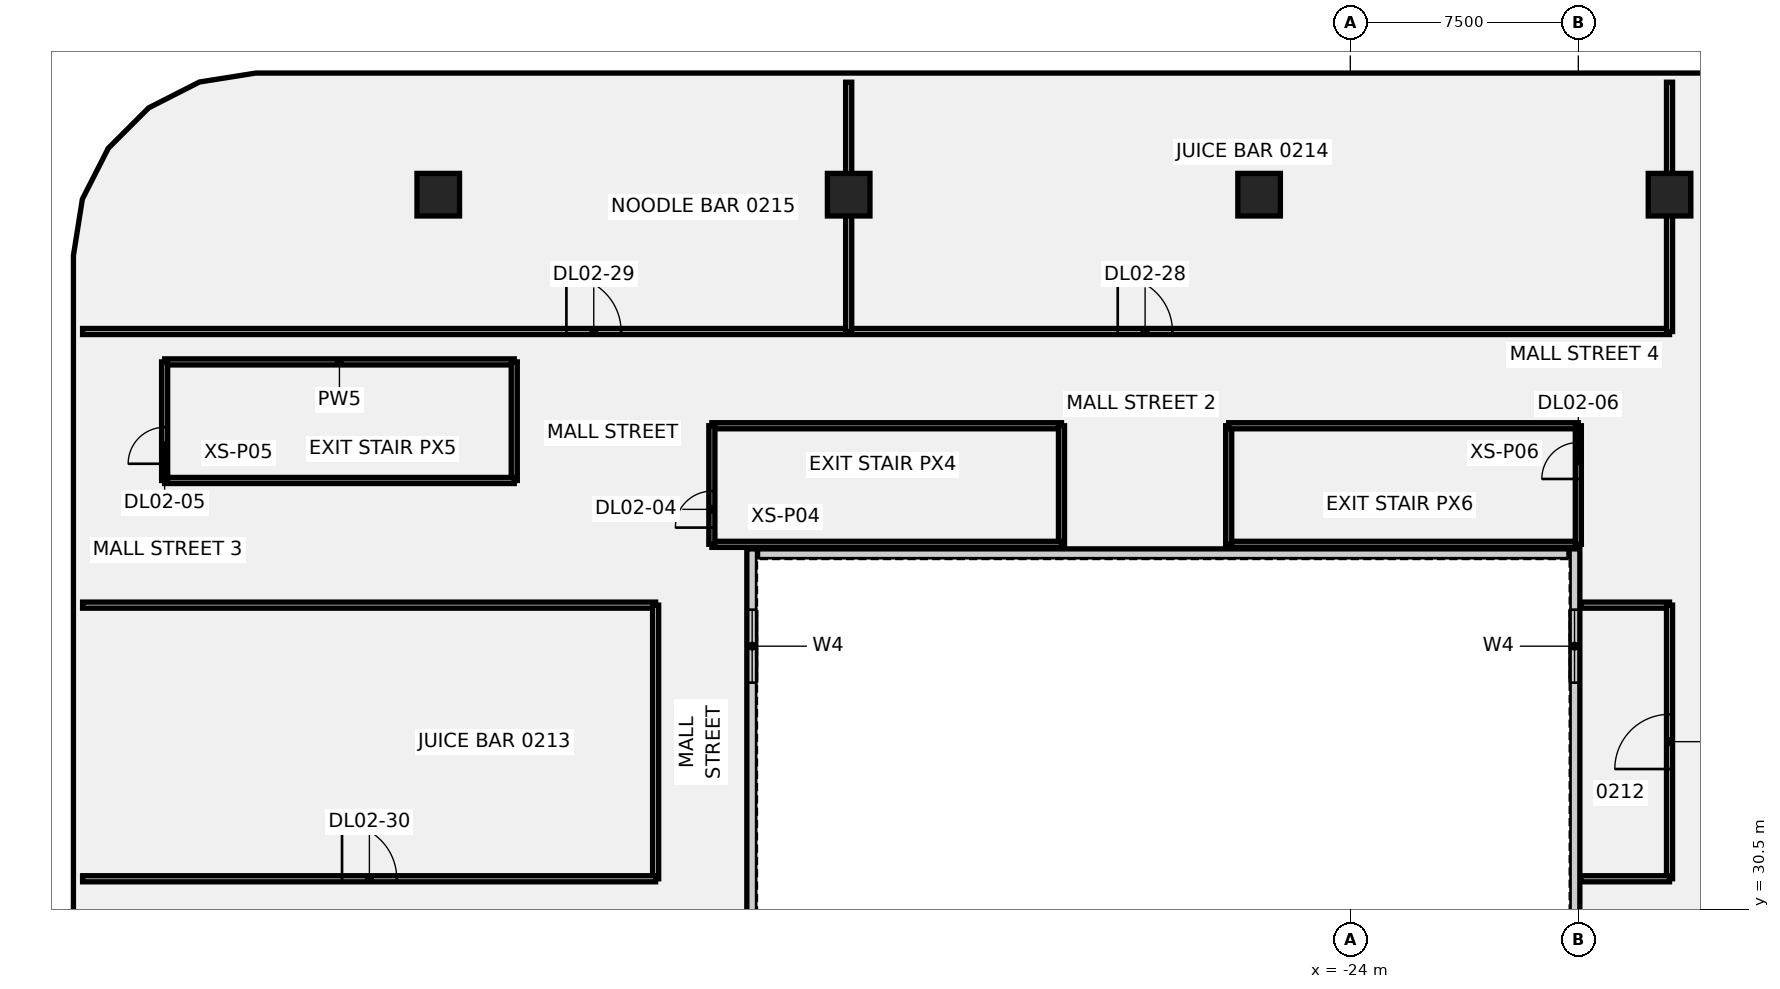
"""IFC4 building model, lengths in metres.
Left out: names, types, materials, properties, quantities, classifications, styles, units other than length and angle.
Written with IfcOpenShell. Run it as: python <this file> out.ifc"""

import sys

from ifc_helpers import new_model, si_unit, direction, frame, frame_2d, origin, origin_2d, place, context, subcontext, project, spatial, rectangle, extrude, element, fill, save


model = new_model("IFC4")
c1 = context("Model", 3, precision=1e-05, world=origin(), true_north=direction((0.0, 1.0)))
c2 = subcontext(c1, "Body", "Model", "MODEL_VIEW")
j1 = project(units=[si_unit("LENGTHUNIT", "METRE"), si_unit("PLANEANGLEUNIT", "RADIAN")], contexts=[c1])
p1 = place(None, origin())
s1 = spatial("IfcSite", under=j1, at=p1, CompositionType="ELEMENT")
p2 = place(p1, origin())
s2 = spatial("IfcBuilding", under=s1, at=p2, CompositionType="ELEMENT")
p3 = place(p2, frame((0.0, 0.0, 15.0)))
s3 = spatial("IfcBuildingStorey", under=s2, at=p3, CompositionType="ELEMENT", Elevation=15.0)
for number, where, z_axis, x_axis in (
    (1, (-54.0, 54.0, -0.5), (0.0, 0.0, 1.0), (1.0, 0.0, 0.0)),
    (2, (-40.5, 54.0, -0.5), (0.0, 0.0, 1.0), (1.0, 0.0, 0.0)),
    (3, (-27.0, 54.0, -0.5), (0.0, 0.0, 1.0), (1.0, 0.0, 0.0)),
    (4, (-13.5, 54.0, -0.5), (0.0, 0.0, 1.0), (1.0, 0.0, 0.0)),
):
    element("IfcColumn", number, at=place(p3, frame(where, z_axis=z_axis, x_axis=x_axis)), inside=s3, PredefinedType="COLUMN", context=c2, shape_type="SweptSolid", body=[
        extrude(rectangle(XDim=1.4, YDim=1.4, at=origin_2d()), origin(), (0.0, 0.0, 1.0), 5.0),
    ])
p4 = place(p3, frame((-63.0, 48.5, 0.0), z_axis=(0.0, 0.0, 1.0), x_axis=(1.0, 0.0, 0.0)))
e5 = element("IfcWall", 5, at=p4, inside=s3, PredefinedType="PARTITIONING", context=c2, shape_type="SweptSolid", body=[
    extrude(rectangle(XDim=11.5, YDim=0.2, at=frame_2d((5.75, 0.0))), origin(), (0.0, 0.0, 1.0), 4.5),
])
p5 = place(p3, frame((-51.5, 44.6, 0.0), z_axis=(0.0, 0.0, 1.0), x_axis=(0.0, 1.0, 0.0)))
e6 = element("IfcWall", 6, at=p5, inside=s3, PredefinedType="PARTITIONING", context=c2, shape_type="SweptSolid", body=[
    extrude(rectangle(XDim=3.9, YDim=0.2, at=frame_2d((1.95, 0.0))), origin(), (0.0, 0.0, 1.0), 4.5),
])
p6 = place(p3, frame((-63.0, 44.6, 0.0), z_axis=(0.0, 0.0, 1.0), x_axis=(1.0, 0.0, 0.0)))
e7 = element("IfcWall", 7, at=p6, inside=s3, PredefinedType="PARTITIONING", context=c2, shape_type="SweptSolid", body=[
    extrude(rectangle(XDim=11.5, YDim=0.2, at=frame_2d((5.75, 0.0))), origin(), (0.0, 0.0, 1.0), 4.5),
])
p7 = place(p3, frame((-63.0, 44.6, 0.0), z_axis=(0.0, 0.0, 1.0), x_axis=(0.0, 1.0, 0.0)))
e8 = element("IfcWall", 8, at=p7, inside=s3, PredefinedType="PARTITIONING", context=c2, shape_type="SweptSolid", body=[
    extrude(rectangle(XDim=3.9, YDim=0.2, at=frame_2d((1.95, 0.0))), origin(), (0.0, 0.0, 1.0), 4.5),
])
p8 = place(p7, frame((0.55, 0.0, 0.0)))
e9 = element("IfcOpeningElement", 9, at=p8, cuts=e8, PredefinedType="OPENING", context=c2, shape_type="SweptSolid", body=[
    extrude(rectangle(XDim=1.2, YDim=2.1, at=frame_2d((0.6, 1.05))), frame((0.0, 0.11, 0.0), z_axis=(0.0, -1.0, 0.0), x_axis=(1.0, 0.0, 0.0)), (0.0, 0.0, 1.0), 0.22),
])
p9 = place(p3, frame((-45.0, 46.4, 0.0), z_axis=(0.0, 0.0, 1.0), x_axis=(1.0, 0.0, 0.0)))
e10 = element("IfcWall", 10, at=p9, inside=s3, PredefinedType="PARTITIONING", context=c2, shape_type="SweptSolid", body=[
    extrude(rectangle(XDim=11.5, YDim=0.2, at=frame_2d((5.75, 0.0))), origin(), (0.0, 0.0, 1.0), 4.5),
])
p10 = place(p3, frame((-33.5, 42.5, 0.0), z_axis=(0.0, 0.0, 1.0), x_axis=(0.0, 1.0, 0.0)))
e11 = element("IfcWall", 11, at=p10, inside=s3, PredefinedType="PARTITIONING", context=c2, shape_type="SweptSolid", body=[
    extrude(rectangle(XDim=3.9, YDim=0.2, at=frame_2d((1.95, 0.0))), origin(), (0.0, 0.0, 1.0), 4.5),
])
p11 = place(p3, frame((-45.0, 42.5, 0.0), z_axis=(0.0, 0.0, 1.0), x_axis=(1.0, 0.0, 0.0)))
e12 = element("IfcWall", 12, at=p11, inside=s3, PredefinedType="PARTITIONING", context=c2, shape_type="SweptSolid", body=[
    extrude(rectangle(XDim=11.5, YDim=0.2, at=frame_2d((5.75, 0.0))), origin(), (0.0, 0.0, 1.0), 4.5),
])
p12 = place(p3, frame((-45.0, 42.5, 0.0), z_axis=(0.0, 0.0, 1.0), x_axis=(0.0, 1.0, 0.0)))
e13 = element("IfcWall", 13, at=p12, inside=s3, PredefinedType="PARTITIONING", context=c2, shape_type="SweptSolid", body=[
    extrude(rectangle(XDim=3.9, YDim=0.2, at=frame_2d((1.95, 0.0))), origin(), (0.0, 0.0, 1.0), 4.5),
])
p13 = place(p12, frame((0.55, 0.0, 0.0)))
e14 = element("IfcOpeningElement", 14, at=p13, cuts=e13, PredefinedType="OPENING", context=c2, shape_type="SweptSolid", body=[
    extrude(rectangle(XDim=1.2, YDim=2.1, at=frame_2d((0.6, 1.05))), frame((0.0, 0.11, 0.0), z_axis=(0.0, -1.0, 0.0), x_axis=(1.0, 0.0, 0.0)), (0.0, 0.0, 1.0), 0.22),
])
p14 = place(p3, frame((-28.0, 42.5, 0.0), z_axis=(0.0, 0.0, 1.0), x_axis=(1.0, 0.0, 0.0)))
e15 = element("IfcWall", 15, at=p14, inside=s3, PredefinedType="PARTITIONING", context=c2, shape_type="SweptSolid", body=[
    extrude(rectangle(XDim=11.5, YDim=0.2, at=frame_2d((5.75, 0.0))), origin(), (0.0, 0.0, 1.0), 4.5),
])
p15 = place(p3, frame((-28.0, 42.5, 0.0), z_axis=(0.0, 0.0, 1.0), x_axis=(0.0, 1.0, 0.0)))
e16 = element("IfcWall", 16, at=p15, inside=s3, PredefinedType="PARTITIONING", context=c2, shape_type="SweptSolid", body=[
    extrude(rectangle(XDim=3.9, YDim=0.2, at=frame_2d((1.95, 0.0))), origin(), (0.0, 0.0, 1.0), 4.5),
])
p16 = place(p3, frame((-28.0, 46.4, 0.0), z_axis=(0.0, 0.0, 1.0), x_axis=(1.0, 0.0, 0.0)))
e17 = element("IfcWall", 17, at=p16, inside=s3, PredefinedType="PARTITIONING", context=c2, shape_type="SweptSolid", body=[
    extrude(rectangle(XDim=11.5, YDim=0.2, at=frame_2d((5.75, 0.0))), origin(), (0.0, 0.0, 1.0), 4.5),
])
p17 = place(p3, frame((-16.5, 42.5, 0.0), z_axis=(0.0, 0.0, 1.0), x_axis=(0.0, 1.0, 0.0)))
e18 = element("IfcWall", 18, at=p17, inside=s3, PredefinedType="PARTITIONING", context=c2, shape_type="SweptSolid", body=[
    extrude(rectangle(XDim=3.9, YDim=0.2, at=frame_2d((1.95, 0.0))), origin(), (0.0, 0.0, 1.0), 4.5),
])
p18 = place(p17, frame((2.15, 0.0, 0.0)))
e19 = element("IfcOpeningElement", 19, at=p18, cuts=e18, PredefinedType="OPENING", context=c2, shape_type="SweptSolid", body=[
    extrude(rectangle(XDim=1.2, YDim=2.1, at=frame_2d((0.6, 1.05))), frame((0.0, 0.11, 0.0), z_axis=(0.0, -1.0, 0.0), x_axis=(1.0, 0.0, 0.0)), (0.0, 0.0, 1.0), 0.22),
])
p19 = place(p3, frame((-65.699, 40.5, 0.0), z_axis=(0.0, 0.0, 1.0), x_axis=(1.0, 0.0, 0.0)))
e20 = element("IfcWall", 20, at=p19, inside=s3, PredefinedType="PARTITIONING", context=c2, shape_type="SweptSolid", body=[
    extrude(rectangle(XDim=18.849, YDim=0.2, at=frame_2d((9.424, 0.0))), origin(), (0.0, 0.0, 1.0), 4.5),
])
p20 = place(p3, frame((-46.85, 31.5, 0.0), z_axis=(0.0, 0.0, 1.0), x_axis=(0.0, 1.0, 0.0)))
e21 = element("IfcWall", 21, at=p20, inside=s3, PredefinedType="PARTITIONING", context=c2, shape_type="SweptSolid", body=[
    extrude(rectangle(XDim=9.0, YDim=0.2, at=frame_2d((4.5, 0.0))), origin(), (0.0, 0.0, 1.0), 4.5),
])
p21 = place(p3, frame((-65.699, 31.5, 0.0), z_axis=(0.0, 0.0, 1.0), x_axis=(1.0, 0.0, 0.0)))
e22 = element("IfcWall", 22, at=p21, inside=s3, PredefinedType="PARTITIONING", context=c2, shape_type="SweptSolid", body=[
    extrude(rectangle(XDim=18.849, YDim=0.2, at=frame_2d((9.424, 0.0))), origin(), (0.0, 0.0, 1.0), 4.5),
])
p22 = place(p21, frame((8.534, 0.0, 0.0)))
e23 = element("IfcOpeningElement", 23, at=p22, cuts=e22, PredefinedType="OPENING", context=c2, shape_type="SweptSolid", body=[
    extrude(rectangle(XDim=1.8, YDim=2.1, at=frame_2d((0.9, 1.05))), frame((0.0, 0.11, 0.0), z_axis=(0.0, -1.0, 0.0), x_axis=(1.0, 0.0, 0.0)), (0.0, 0.0, 1.0), 0.22),
])
p23 = place(p3, frame((-65.699, 49.5, 0.0), z_axis=(0.0, 0.0, 1.0), x_axis=(1.0, 0.0, 0.0)))
e24 = element("IfcWall", 24, at=p23, inside=s3, PredefinedType="PARTITIONING", context=c2, shape_type="SweptSolid", body=[
    extrude(rectangle(XDim=52.199, YDim=0.2, at=frame_2d((26.1, 0.0))), origin(), (0.0, 0.0, 1.0), 4.5),
])
p24 = place(p23, frame((34.049, 0.0, 0.0)))
e25 = element("IfcOpeningElement", 25, at=p24, cuts=e24, PredefinedType="OPENING", context=c2, shape_type="SweptSolid", body=[
    extrude(rectangle(XDim=1.8, YDim=2.1, at=frame_2d((0.9, 1.05))), frame((0.0, 0.11, 0.0), z_axis=(0.0, -1.0, 0.0), x_axis=(1.0, 0.0, 0.0)), (0.0, 0.0, 1.0), 0.22),
])
p25 = place(p23, frame((15.914, 0.0, 0.0)))
e26 = element("IfcOpeningElement", 26, at=p25, cuts=e24, PredefinedType="OPENING", context=c2, shape_type="SweptSolid", body=[
    extrude(rectangle(XDim=1.8, YDim=2.1, at=frame_2d((0.9, 1.05))), frame((0.0, 0.11, 0.0), z_axis=(0.0, -1.0, 0.0), x_axis=(1.0, 0.0, 0.0)), (0.0, 0.0, 1.0), 0.22),
])
for number, where, z_axis, x_axis in (
    (27, (-13.5, 49.5, 0.0), (0.0, 0.0, 1.0), (0.0, 1.0, 0.0)),
    (28, (-40.5, 49.5, 0.0), (0.0, 0.0, 1.0), (0.0, 1.0, 0.0)),
):
    element("IfcWall", number, at=place(p3, frame(where, z_axis=z_axis, x_axis=x_axis)), inside=s3, PredefinedType="PARTITIONING", context=c2, shape_type="SweptSolid", body=[
        extrude(rectangle(XDim=8.199, YDim=0.2, at=frame_2d((4.1, 0.0))), origin(), (0.0, 0.0, 1.0), 4.5),
    ])
p26 = place(p3, frame((-16.42, 40.5, 0.0), z_axis=(0.0, 0.0, 1.0), x_axis=(1.0, 0.0, 0.0)))
e29 = element("IfcWall", 29, at=p26, inside=s3, PredefinedType="PARTITIONING", context=c2, shape_type="SweptSolid", body=[
    extrude(rectangle(XDim=2.92, YDim=0.2, at=frame_2d((1.46, 0.0))), origin(), (0.0, 0.0, 1.0), 4.5),
])
p27 = place(p3, frame((-13.5, 31.5, 0.0), z_axis=(0.0, 0.0, 1.0), x_axis=(0.0, 1.0, 0.0)))
e30 = element("IfcWall", 30, at=p27, inside=s3, PredefinedType="PARTITIONING", context=c2, shape_type="SweptSolid", body=[
    extrude(rectangle(XDim=9.0, YDim=0.2, at=frame_2d((4.5, 0.0))), origin(), (0.0, 0.0, 1.0), 4.5),
])
p28 = place(p27, frame((3.61, 0.0, 0.0)))
e31 = element("IfcOpeningElement", 31, at=p28, cuts=e30, PredefinedType="OPENING", context=c2, shape_type="SweptSolid", body=[
    extrude(rectangle(XDim=1.8, YDim=2.1, at=frame_2d((0.9, 1.05))), frame((0.0, 0.11, 0.0), z_axis=(0.0, -1.0, 0.0), x_axis=(1.0, 0.0, 0.0)), (0.0, 0.0, 1.0), 0.22),
])
p29 = place(p3, frame((-16.42, 31.5, 0.0), z_axis=(0.0, 0.0, 1.0), x_axis=(1.0, 0.0, 0.0)))
e32 = element("IfcWall", 32, at=p29, inside=s3, PredefinedType="PARTITIONING", context=c2, shape_type="SweptSolid", body=[
    extrude(rectangle(XDim=2.92, YDim=0.2, at=frame_2d((1.46, 0.0))), origin(), (0.0, 0.0, 1.0), 4.5),
])
p30 = place(p3, frame((-43.5, 42.175, 0.0), z_axis=(0.0, 0.0, 1.0), x_axis=(1.0, 0.0, 0.0)))
e33 = element("IfcWall", 33, at=p30, inside=s3, PredefinedType="SOLIDWALL", context=c2, shape_type="SweptSolid", body=[
    extrude(rectangle(XDim=26.7, YDim=0.35, at=frame_2d((13.35, 0.0))), origin(), (0.0, 0.0, 1.0), 4.5),
])
p31 = place(p3, frame((-43.675, 23.65, 0.0), z_axis=(0.0, 0.0, 1.0), x_axis=(0.0, 1.0, 0.0)))
e34 = element("IfcWall", 34, at=p31, inside=s3, PredefinedType="SOLIDWALL", context=c2, shape_type="SweptSolid", body=[
    extrude(rectangle(XDim=18.7, YDim=0.35, at=frame_2d((9.35, 0.0))), origin(), (0.0, 0.0, 1.0), 4.5),
])
p32 = place(p31, frame((14.3, 0.0, 1.0)))
e35 = element("IfcOpeningElement", 35, at=p32, cuts=e34, PredefinedType="OPENING", context=c2, shape_type="SweptSolid", body=[
    extrude(rectangle(XDim=2.4, YDim=1.8, at=frame_2d((1.2, 0.9))), frame((0.0, 0.185, 0.0), z_axis=(0.0, -1.0, 0.0), x_axis=(1.0, 0.0, 0.0)), (0.0, 0.0, 1.0), 0.37),
])
p33 = place(p3, frame((-16.625, 23.65, 0.0), z_axis=(0.0, 0.0, 1.0), x_axis=(0.0, 1.0, 0.0)))
e36 = element("IfcWall", 36, at=p33, inside=s3, PredefinedType="SOLIDWALL", context=c2, shape_type="SweptSolid", body=[
    extrude(rectangle(XDim=18.7, YDim=0.35, at=frame_2d((9.35, 0.0))), origin(), (0.0, 0.0, 1.0), 4.5),
])
p34 = place(p33, frame((14.3, 0.0, 1.0)))
e37 = element("IfcOpeningElement", 37, at=p34, cuts=e36, PredefinedType="OPENING", context=c2, shape_type="SweptSolid", body=[
    extrude(rectangle(XDim=2.4, YDim=1.8, at=frame_2d((1.2, 0.9))), frame((0.0, 0.185, 0.0), z_axis=(0.0, -1.0, 0.0), x_axis=(1.0, 0.0, 0.0)), (0.0, 0.0, 1.0), 0.37),
])
p35 = place(p13, origin())
e38 = element("IfcDoor", 38, at=p35, inside=s3, OperationType="SINGLE_SWING_RIGHT", PredefinedType="DOOR", context=c2, shape_type="SweptSolid", body=[
    extrude(rectangle(XDim=1.2, YDim=2.1, at=frame_2d((0.6, 1.05))), frame((0.0, 0.025, 0.0), z_axis=(0.0, -1.0, 0.0), x_axis=(1.0, 0.0, 0.0)), (0.0, 0.0, 1.0), 0.05),
])
fill(e14, e38)
p36 = place(p8, origin())
e39 = element("IfcDoor", 39, at=p36, inside=s3, OperationType="SINGLE_SWING_LEFT", PredefinedType="DOOR", context=c2, shape_type="SweptSolid", body=[
    extrude(rectangle(XDim=1.2, YDim=2.1, at=frame_2d((0.6, 1.05))), frame((0.0, 0.025, 0.0), z_axis=(0.0, -1.0, 0.0), x_axis=(1.0, 0.0, 0.0)), (0.0, 0.0, 1.0), 0.05),
])
fill(e9, e39)
p37 = place(p18, origin())
e40 = element("IfcDoor", 40, at=p37, inside=s3, OperationType="SINGLE_SWING_RIGHT", PredefinedType="DOOR", context=c2, shape_type="SweptSolid", body=[
    extrude(rectangle(XDim=1.2, YDim=2.1, at=frame_2d((0.6, 1.05))), frame((0.0, 0.025, 0.0), z_axis=(0.0, -1.0, 0.0), x_axis=(1.0, 0.0, 0.0)), (0.0, 0.0, 1.0), 0.05),
])
fill(e19, e40)
p38 = place(p28, origin())
e41 = element("IfcDoor", 41, at=p38, inside=s3, OperationType="SINGLE_SWING_LEFT", PredefinedType="DOOR", context=c2, shape_type="SweptSolid", body=[
    extrude(rectangle(XDim=1.8, YDim=2.1, at=frame_2d((0.9, 1.05))), frame((0.0, 0.025, 0.0), z_axis=(0.0, -1.0, 0.0), x_axis=(1.0, 0.0, 0.0)), (0.0, 0.0, 1.0), 0.05),
])
fill(e31, e41)
p39 = place(p24, origin())
e42 = element("IfcDoor", 42, at=p39, inside=s3, OperationType="SINGLE_SWING_RIGHT", PredefinedType="DOOR", context=c2, shape_type="SweptSolid", body=[
    extrude(rectangle(XDim=1.8, YDim=2.1, at=frame_2d((0.9, 1.05))), frame((0.0, 0.025, 0.0), z_axis=(0.0, -1.0, 0.0), x_axis=(1.0, 0.0, 0.0)), (0.0, 0.0, 1.0), 0.05),
])
fill(e25, e42)
p40 = place(p25, origin())
e43 = element("IfcDoor", 43, at=p40, inside=s3, OperationType="SINGLE_SWING_LEFT", PredefinedType="DOOR", context=c2, shape_type="SweptSolid", body=[
    extrude(rectangle(XDim=1.8, YDim=2.1, at=frame_2d((0.9, 1.05))), frame((0.0, 0.025, 0.0), z_axis=(0.0, -1.0, 0.0), x_axis=(1.0, 0.0, 0.0)), (0.0, 0.0, 1.0), 0.05),
])
fill(e26, e43)
p41 = place(p22, origin())
e44 = element("IfcDoor", 44, at=p41, inside=s3, OperationType="SINGLE_SWING_RIGHT", PredefinedType="DOOR", context=c2, shape_type="SweptSolid", body=[
    extrude(rectangle(XDim=1.8, YDim=2.1, at=frame_2d((0.9, 1.05))), frame((0.0, 0.025, 0.0), z_axis=(0.0, -1.0, 0.0), x_axis=(1.0, 0.0, 0.0)), (0.0, 0.0, 1.0), 0.05),
])
fill(e23, e44)
p42 = place(p32, origin())
e45 = element("IfcWindow", 45, at=p42, inside=s3, PartitioningType="SINGLE_PANEL", PredefinedType="WINDOW", context=c2, shape_type="SweptSolid", body=[
    extrude(rectangle(XDim=2.4, YDim=1.8, at=frame_2d((1.2, 0.9))), frame((0.0, 0.03, 0.0), z_axis=(0.0, -1.0, 0.0), x_axis=(1.0, 0.0, 0.0)), (0.0, 0.0, 1.0), 0.06),
])
fill(e35, e45)
p43 = place(p34, origin())
e46 = element("IfcWindow", 46, at=p43, inside=s3, PartitioningType="SINGLE_PANEL", PredefinedType="WINDOW", context=c2, shape_type="SweptSolid", body=[
    extrude(rectangle(XDim=2.4, YDim=1.8, at=frame_2d((1.2, 0.9))), frame((0.0, 0.03, 0.0), z_axis=(0.0, -1.0, 0.0), x_axis=(1.0, 0.0, 0.0)), (0.0, 0.0, 1.0), 0.06),
])
fill(e37, e46)
save(model, sys.argv[1])
